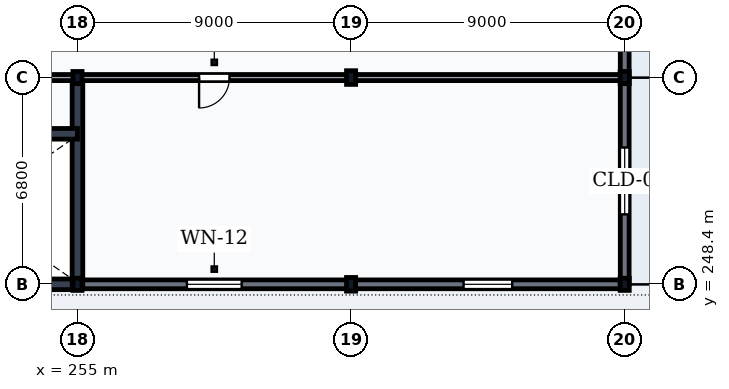
"""IFC4 building model, lengths in metres.
Left out: names, types, materials, properties, quantities, classifications, styles, units other than length and angle.
Written with IfcOpenShell. Run it as: python <this file> out.ifc"""

import sys

from ifc_helpers import new_model, si_unit, direction, frame, frame_2d, origin, origin_2d, place, context, subcontext, project, spatial, rectangle, i_section, extrude, element, fill, save


model = new_model("IFC4")
c1 = context("Model", 3, precision=1e-05, world=origin(), true_north=direction((0.0, 1.0)))
c2 = subcontext(c1, "Body", "Model", "MODEL_VIEW")
j1 = project(units=[si_unit("LENGTHUNIT", "METRE"), si_unit("PLANEANGLEUNIT", "RADIAN")], contexts=[c1])
p1 = place(None, origin())
s1 = spatial("IfcSite", under=j1, at=p1, CompositionType="ELEMENT")
p2 = place(p1, origin())
s2 = spatial("IfcBuilding", under=s1, at=p2, CompositionType="ELEMENT")
p3 = place(p2, frame((0.0, 0.0, 5.4)))
s3 = spatial("IfcBuildingStorey", under=s2, at=p3, CompositionType="ELEMENT", Elevation=5.4)
for number, where, z_axis, x_axis in (
    (1, (255.0, 248.4, 0.0), (0.0, 0.0, 1.0), (1.0, 0.0, 0.0)),
    (2, (255.0, 255.2, 0.0), (0.0, 0.0, 1.0), (1.0, 0.0, 0.0)),
):
    element("IfcColumn", number, at=place(p3, frame(where, z_axis=z_axis, x_axis=x_axis)), inside=s3, PredefinedType="COLUMN", context=c2, shape_type="SweptSolid", body=[
        extrude(i_section(OverallWidth=0.3, OverallDepth=0.4, WebThickness=0.013, FlangeThickness=0.024, FilletRadius=0.027, at=origin_2d()), origin(), (0.0, 0.0, 1.0), 5.1),
    ])
for number, where, z_axis, x_axis in (
    (3, (264.0, 248.4, 0.0), (0.0, 0.0, 1.0), (1.0, 0.0, 0.0)),
    (4, (264.0, 255.2, 0.0), (0.0, 0.0, 1.0), (1.0, 0.0, 0.0)),
):
    element("IfcColumn", number, at=place(p3, frame(where, z_axis=z_axis, x_axis=x_axis)), inside=s3, PredefinedType="COLUMN", context=c2, shape_type="SweptSolid", body=[
        extrude(i_section(OverallWidth=0.3, OverallDepth=0.45, WebThickness=0.014, FlangeThickness=0.026, FilletRadius=0.027, at=origin_2d()), origin(), (0.0, 0.0, 1.0), 5.1),
    ])
for number, where, z_axis, x_axis in (
    (5, (273.0, 248.4, 0.0), (0.0, 0.0, 1.0), (1.0, 0.0, 0.0)),
    (6, (273.0, 255.2, 0.0), (0.0, 0.0, 1.0), (1.0, 0.0, 0.0)),
):
    element("IfcColumn", number, at=place(p3, frame(where, z_axis=z_axis, x_axis=x_axis)), inside=s3, PredefinedType="COLUMN", context=c2, shape_type="SweptSolid", body=[
        extrude(i_section(OverallWidth=0.3, OverallDepth=0.4, WebThickness=0.013, FlangeThickness=0.024, FilletRadius=0.027, at=origin_2d()), origin(), (0.0, 0.0, 1.0), 5.1),
    ])
p4 = place(p3, frame((255.006, 248.4, 0.0), z_axis=(0.0, 0.0, 1.0), x_axis=(1.0, 0.0, 0.0)))
e7 = element("IfcWall", 7, at=p4, inside=s3, PredefinedType="SOLIDWALL", context=c2, shape_type="SweptSolid", body=[
    extrude(rectangle(XDim=8.988, YDim=0.29, at=frame_2d((4.494, 0.0))), origin(), (0.0, 0.0, 1.0), 4.508),
])
p5 = place(p4, frame((3.594, 0.0, 0.95)))
e8 = element("IfcOpeningElement", 8, at=p5, cuts=e7, PredefinedType="OPENING", context=c2, shape_type="SweptSolid", body=[
    extrude(rectangle(XDim=1.8, YDim=2.0, at=frame_2d((0.9, 1.0))), frame((0.0, 0.16, 0.0), z_axis=(0.0, -1.0, 0.0), x_axis=(1.0, 0.0, 0.0)), (0.0, 0.0, 1.0), 0.32),
])
p6 = place(p3, frame((264.006, 248.4, 0.0), z_axis=(0.0, 0.0, 1.0), x_axis=(1.0, 0.0, 0.0)))
e9 = element("IfcWall", 9, at=p6, inside=s3, PredefinedType="SOLIDWALL", context=c2, shape_type="SweptSolid", body=[
    extrude(rectangle(XDim=8.988, YDim=0.29, at=frame_2d((4.494, 0.0))), origin(), (0.0, 0.0, 1.0), 4.508),
])
p7 = place(p6, frame((3.694, 0.0, 0.95)))
e10 = element("IfcOpeningElement", 10, at=p7, cuts=e9, PredefinedType="OPENING", context=c2, shape_type="SweptSolid", body=[
    extrude(rectangle(XDim=1.6, YDim=2.0, at=frame_2d((0.8, 1.0))), frame((0.0, 0.16, 0.0), z_axis=(0.0, -1.0, 0.0), x_axis=(1.0, 0.0, 0.0)), (0.0, 0.0, 1.0), 0.32),
])
p8 = place(p3, frame((273.0, 248.406, 0.0), z_axis=(0.0, 0.0, 1.0), x_axis=(0.0, 1.0, 0.0)))
e11 = element("IfcWall", 11, at=p8, inside=s3, PredefinedType="SOLIDWALL", context=c2, shape_type="SweptSolid", body=[
    extrude(rectangle(XDim=6.788, YDim=0.29, at=frame_2d((3.394, 0.0))), origin(), (0.0, 0.0, 1.0), 4.628),
])
p9 = place(p8, frame((2.294, 0.0, 0.95)))
e12 = element("IfcOpeningElement", 12, at=p9, cuts=e11, PredefinedType="OPENING", context=c2, shape_type="SweptSolid", body=[
    extrude(rectangle(XDim=2.2, YDim=2.8, at=frame_2d((1.1, 1.4))), frame((0.0, 0.16, 0.0), z_axis=(0.0, -1.0, 0.0), x_axis=(1.0, 0.0, 0.0)), (0.0, 0.0, 1.0), 0.32),
])
p10 = place(p3, frame((273.0, 255.206, 0.0), z_axis=(0.0, 0.0, 1.0), x_axis=(0.0, 1.0, 0.0)))
e13 = element("IfcWall", 13, at=p10, inside=s3, PredefinedType="SOLIDWALL", context=c2, shape_type="SweptSolid", body=[
    extrude(rectangle(XDim=7.588, YDim=0.29, at=frame_2d((3.794, 0.0))), origin(), (0.0, 0.0, 1.0), 4.588),
])
p11 = place(p10, frame((4.066, 0.0, 0.95)))
e14 = element("IfcOpeningElement", 14, at=p11, cuts=e13, PredefinedType="OPENING", context=c2, shape_type="SweptSolid", body=[
    extrude(rectangle(XDim=2.0, YDim=2.6, at=frame_2d((1.0, 1.3))), frame((0.0, 0.16, 0.0), z_axis=(0.0, -1.0, 0.0), x_axis=(1.0, 0.0, 0.0)), (0.0, 0.0, 1.0), 0.32),
])
p12 = place(p3, frame((246.0, 248.4, 0.0), z_axis=(0.0, 0.0, 1.0), x_axis=(1.0, 0.0, 0.0)))
e15 = element("IfcWall", 15, at=p12, inside=s3, PredefinedType="SHEAR", context=c2, shape_type="SweptSolid", body=[
    extrude(rectangle(XDim=9.0, YDim=0.35, at=frame_2d((4.5, 0.0))), origin(), (0.0, 0.0, 1.0), 4.86),
])
p13 = place(p3, frame((255.0, 248.4, 0.0), z_axis=(0.0, 0.0, 1.0), x_axis=(0.0, 1.0, 0.0)))
e16 = element("IfcWall", 16, at=p13, inside=s3, PredefinedType="SHEAR", context=c2, shape_type="SweptSolid", body=[
    extrude(rectangle(XDim=6.8, YDim=0.35, at=frame_2d((3.4, 0.0))), origin(), (0.0, 0.0, 1.0), 4.86),
])
p14 = place(p3, frame((246.0, 253.35, 0.0), z_axis=(0.0, 0.0, 1.0), x_axis=(1.0, 0.0, 0.0)))
e17 = element("IfcWall", 17, at=p14, inside=s3, PredefinedType="SHEAR", context=c2, shape_type="SweptSolid", body=[
    extrude(rectangle(XDim=9.0, YDim=0.35, at=frame_2d((4.5, 0.0))), origin(), (0.0, 0.0, 1.0), 4.86),
])
p15 = place(p14, frame((0.275, 0.0, 0.0)))
e18 = element("IfcOpeningElement", 18, at=p15, cuts=e17, PredefinedType="OPENING", context=c2, shape_type="SweptSolid", body=[
    extrude(rectangle(XDim=1.15, YDim=2.15, at=frame_2d((0.575, 1.075))), frame((0.0, 0.19, 0.0), z_axis=(0.0, -1.0, 0.0), x_axis=(1.0, 0.0, 0.0)), (0.0, 0.0, 1.0), 0.38),
])
p16 = place(p3, frame((246.0, 255.2, 0.0), z_axis=(0.0, 0.0, 1.0), x_axis=(1.0, 0.0, 0.0)))
e19 = element("IfcWall", 19, at=p16, inside=s3, PredefinedType="PARTITIONING", context=c2, shape_type="SweptSolid", body=[
    extrude(rectangle(XDim=9.0, YDim=0.2, at=frame_2d((4.5, 0.0))), origin(), (0.0, 0.0, 1.0), 4.308),
])
p17 = place(p16, frame((3.775, 0.0, 0.0)))
e20 = element("IfcOpeningElement", 20, at=p17, cuts=e19, PredefinedType="OPENING", context=c2, shape_type="SweptSolid", body=[
    extrude(rectangle(XDim=1.45, YDim=2.2, at=frame_2d((0.725, 1.1))), frame((0.0, 0.115, 0.0), z_axis=(0.0, -1.0, 0.0), x_axis=(1.0, 0.0, 0.0)), (0.0, 0.0, 1.0), 0.23),
])
p18 = place(p3, frame((255.0, 255.2, 0.0), z_axis=(0.0, 0.0, 1.0), x_axis=(1.0, 0.0, 0.0)))
e21 = element("IfcWall", 21, at=p18, inside=s3, PredefinedType="PARTITIONING", context=c2, shape_type="SweptSolid", body=[
    extrude(rectangle(XDim=18.0, YDim=0.2, at=frame_2d((9.0, 0.0))), origin(), (0.0, 0.0, 1.0), 4.308),
])
p19 = place(p18, frame((4.0, 0.0, 0.0)))
e22 = element("IfcOpeningElement", 22, at=p19, cuts=e21, PredefinedType="OPENING", context=c2, shape_type="SweptSolid", body=[
    extrude(rectangle(XDim=1.0, YDim=2.1, at=frame_2d((0.5, 1.05))), frame((0.0, 0.115, 0.0), z_axis=(0.0, -1.0, 0.0), x_axis=(1.0, 0.0, 0.0)), (0.0, 0.0, 1.0), 0.23),
])
p20 = place(p5, origin())
e23 = element("IfcWindow", 23, at=p20, inside=s3, PartitioningType="DOUBLE_PANEL_VERTICAL", PredefinedType="WINDOW", context=c2, shape_type="SweptSolid", body=[
    extrude(rectangle(XDim=1.8, YDim=2.0, at=frame_2d((0.9, 1.0))), frame((0.0, 0.03, 0.0), z_axis=(0.0, -1.0, 0.0), x_axis=(1.0, 0.0, 0.0)), (0.0, 0.0, 1.0), 0.06),
])
fill(e8, e23)
p21 = place(p7, origin())
e24 = element("IfcWindow", 24, at=p21, inside=s3, PartitioningType="SINGLE_PANEL", PredefinedType="WINDOW", context=c2, shape_type="SweptSolid", body=[
    extrude(rectangle(XDim=1.6, YDim=2.0, at=frame_2d((0.8, 1.0))), frame((0.0, 0.03, 0.0), z_axis=(0.0, -1.0, 0.0), x_axis=(1.0, 0.0, 0.0)), (0.0, 0.0, 1.0), 0.06),
])
fill(e10, e24)
p22 = place(p9, origin())
e25 = element("IfcWindow", 25, at=p22, inside=s3, PartitioningType="DOUBLE_PANEL_VERTICAL", PredefinedType="WINDOW", context=c2, shape_type="SweptSolid", body=[
    extrude(rectangle(XDim=2.2, YDim=2.8, at=frame_2d((1.1, 1.4))), frame((0.0, 0.03, 0.0), z_axis=(0.0, -1.0, 0.0), x_axis=(1.0, 0.0, 0.0)), (0.0, 0.0, 1.0), 0.06),
])
fill(e12, e25)
p23 = place(p19, frame((1.0, 0.0, 0.0), z_axis=(0.0, 0.0, 1.0), x_axis=(-1.0, 0.0, 0.0)))
e26 = element("IfcDoor", 26, at=p23, inside=s3, OperationType="SINGLE_SWING_RIGHT", PredefinedType="DOOR", context=c2, shape_type="SweptSolid", body=[
    extrude(rectangle(XDim=1.0, YDim=2.1, at=frame_2d((0.5, 1.05))), frame((0.0, 0.025, 0.0), z_axis=(0.0, -1.0, 0.0), x_axis=(1.0, 0.0, 0.0)), (0.0, 0.0, 1.0), 0.05),
])
fill(e22, e26)
save(model, sys.argv[1])
